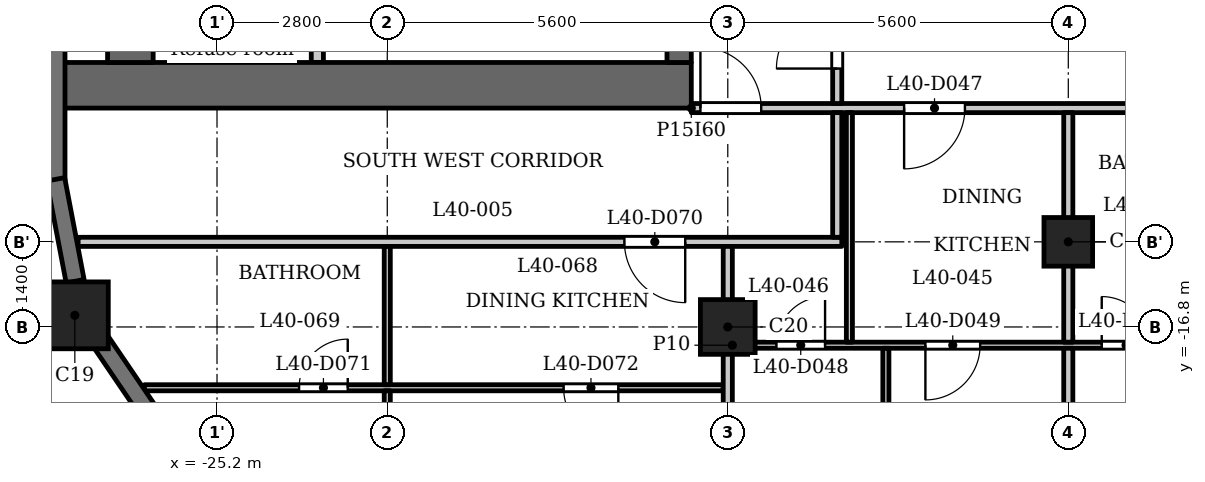
"""IFC4 building model, lengths in metres.
Left out: names, types, materials, properties, quantities, classifications, styles, units other than length and angle.
Written with IfcOpenShell. Run it as: python <this file> out.ifc"""

import sys

from ifc_helpers import new_model, si_unit, direction, frame, frame_2d, origin, origin_2d, place, context, subcontext, project, spatial, rectangle, extrude, element, fill, save


model = new_model("IFC4")
c1 = context("Model", 3, precision=1e-05, world=origin(), true_north=direction((0.0, 1.0)))
c2 = subcontext(c1, "Body", "Model", "MODEL_VIEW")
j1 = project(units=[si_unit("LENGTHUNIT", "METRE"), si_unit("PLANEANGLEUNIT", "RADIAN")], contexts=[c1])
p1 = place(None, origin())
s1 = spatial("IfcSite", under=j1, at=p1, CompositionType="ELEMENT")
p2 = place(p1, origin())
s2 = spatial("IfcBuilding", under=s1, at=p2, CompositionType="ELEMENT")
p3 = place(p2, frame((0.0, 0.0, 157.1)))
s3 = spatial("IfcBuildingStorey", under=s2, at=p3, CompositionType="ELEMENT", Elevation=157.1)
p4 = place(p3, frame((-27.538, -16.609, 0.0), z_axis=(0.0, 0.0, 1.0), x_axis=(1.0, 0.0, 0.0)))
e1 = element("IfcColumn", 1, at=p4, inside=s3, PredefinedType="COLUMN", context=c2, shape_type="SweptSolid", body=[
    extrude(rectangle(XDim=1.1, YDim=1.1, at=origin_2d()), origin(), (0.0, 0.0, 1.0), 3.5),
])
p5 = place(p3, frame((-16.8, -16.8, 0.0), z_axis=(0.0, 0.0, 1.0), x_axis=(1.0, 0.0, 0.0)))
e2 = element("IfcColumn", 2, at=p5, inside=s3, PredefinedType="COLUMN", context=c2, shape_type="SweptSolid", body=[
    extrude(rectangle(XDim=0.9, YDim=0.9, at=origin_2d()), origin(), (0.0, 0.0, 1.0), 3.5),
])
p6 = place(p3, frame((-11.2, -15.4, 0.0), z_axis=(0.0, 0.0, 1.0), x_axis=(1.0, 0.0, 0.0)))
e3 = element("IfcColumn", 3, at=p6, inside=s3, PredefinedType="COLUMN", context=c2, shape_type="SweptSolid", body=[
    extrude(rectangle(XDim=0.8, YDim=0.8, at=origin_2d()), origin(), (0.0, 0.0, 1.0), 3.5),
])
p7 = place(p3, frame((-27.85, -11.75, 0.0), z_axis=(0.0, 0.0, 1.0), x_axis=(0.0, -1.0, 0.0)))
e4 = element("IfcWall", 4, at=p7, inside=s3, PredefinedType="SOLIDWALL", context=c2, shape_type="SweptSolid", body=[
    extrude(rectangle(XDim=2.65, YDim=0.3, at=frame_2d((1.325, 0.0))), origin(), (0.0, 0.0, 1.0), 2.45),
])
p8 = place(p3, frame((-27.853, -14.372, 0.0), z_axis=(0.0, 0.0, 1.0), x_axis=(0.187302784601, -0.982302227871, 0.0)))
e5 = element("IfcWall", 5, at=p8, inside=s3, PredefinedType="SOLIDWALL", context=c2, shape_type="SweptSolid", body=[
    extrude(rectangle(XDim=1.706, YDim=0.3, at=frame_2d((0.853, 0.0))), origin(), (0.0, 0.0, 1.0), 2.45),
])
p9 = place(p3, frame((-27.138, -17.002, 0.0), z_axis=(0.0, 0.0, 1.0), x_axis=(0.562075160946, -0.827086158419, 0.0)))
e6 = element("IfcWall", 6, at=p9, inside=s3, PredefinedType="SOLIDWALL", context=c2, shape_type="SweptSolid", body=[
    extrude(rectangle(XDim=1.706, YDim=0.3, at=frame_2d((0.853, 0.0))), origin(), (0.0, 0.0, 1.0), 2.45),
])
p10 = place(p3, frame((-17.4, -12.825, 0.0), z_axis=(0.0, 0.0, 1.0), x_axis=(-1.0, 0.0, 0.0)))
e7 = element("IfcWall", 7, at=p10, inside=s3, PredefinedType="SHEAR", context=c2, shape_type="SweptSolid", body=[
    extrude(rectangle(XDim=10.4, YDim=0.75, at=frame_2d((5.2, 0.0))), origin(), (0.0, 0.0, 1.0), 3.2),
])
p11 = place(p3, frame((-17.6, -12.45, 0.0), z_axis=(0.0, 0.0, 1.0), x_axis=(0.0, 1.0, 0.0)))
e8 = element("IfcWall", 8, at=p11, inside=s3, PredefinedType="SHEAR", context=c2, shape_type="SweptSolid", body=[
    extrude(rectangle(XDim=24.9, YDim=0.4, at=frame_2d((12.45, 0.0))), origin(), (0.0, 0.0, 1.0), 3.2),
])
p12 = place(p11, frame((8.65, 0.0, 0.0)))
e9 = element("IfcOpeningElement", 9, at=p12, cuts=e8, PredefinedType="OPENING", context=c2, shape_type="SweptSolid", body=[
    extrude(rectangle(XDim=0.9, YDim=2.1, at=frame_2d((0.45, 1.05))), frame((0.0, 0.21, 0.0), z_axis=(0.0, -1.0, 0.0), x_axis=(1.0, 0.0, 0.0)), (0.0, 0.0, 1.0), 0.42),
])
p13 = place(p11, frame((15.6, 0.0, 0.0)))
e10 = element("IfcOpeningElement", 10, at=p13, cuts=e8, PredefinedType="OPENING", context=c2, shape_type="SweptSolid", body=[
    extrude(rectangle(XDim=1.1, YDim=2.1, at=frame_2d((0.55, 1.05))), frame((0.0, 0.21, 0.0), z_axis=(0.0, -1.0, 0.0), x_axis=(1.0, 0.0, 0.0)), (0.0, 0.0, 1.0), 0.42),
])
p14 = place(p11, frame((18.0, 0.0, 0.0)))
e11 = element("IfcOpeningElement", 11, at=p14, cuts=e8, PredefinedType="OPENING", context=c2, shape_type="SweptSolid", body=[
    extrude(rectangle(XDim=1.1, YDim=2.1, at=frame_2d((0.55, 1.05))), frame((0.0, 0.21, 0.0), z_axis=(0.0, -1.0, 0.0), x_axis=(1.0, 0.0, 0.0)), (0.0, 0.0, 1.0), 0.42),
])
p15 = place(p11, frame((23.025, 0.0, 0.0)))
e12 = element("IfcOpeningElement", 12, at=p15, cuts=e8, PredefinedType="OPENING", context=c2, shape_type="SweptSolid", body=[
    extrude(rectangle(XDim=1.1, YDim=2.1, at=frame_2d((0.55, 1.05))), frame((0.0, 0.21, 0.0), z_axis=(0.0, -1.0, 0.0), x_axis=(1.0, 0.0, 0.0)), (0.0, 0.0, 1.0), 0.42),
])
p16 = place(p11, frame((0.775, 0.0, 0.0)))
e13 = element("IfcOpeningElement", 13, at=p16, cuts=e8, PredefinedType="OPENING", context=c2, shape_type="SweptSolid", body=[
    extrude(rectangle(XDim=1.1, YDim=2.1, at=frame_2d((0.55, 1.05))), frame((0.0, 0.21, 0.0), z_axis=(0.0, -1.0, 0.0), x_axis=(1.0, 0.0, 0.0)), (0.0, 0.0, 1.0), 0.42),
])
p17 = place(p11, frame((12.925, 0.0, 0.0)))
e14 = element("IfcOpeningElement", 14, at=p17, cuts=e8, PredefinedType="OPENING", context=c2, shape_type="SweptSolid", body=[
    extrude(rectangle(XDim=1.8, YDim=2.1, at=frame_2d((0.9, 1.05))), frame((0.0, 0.21, 0.0), z_axis=(0.0, -1.0, 0.0), x_axis=(1.0, 0.0, 0.0)), (0.0, 0.0, 1.0), 0.42),
])
p18 = place(p3, frame((-26.625, -12.45, 0.0), z_axis=(0.0, 0.0, 1.0), x_axis=(0.0, 1.0, 0.0)))
e15 = element("IfcWall", 15, at=p18, inside=s3, PredefinedType="SHEAR", context=c2, shape_type="SweptSolid", body=[
    extrude(rectangle(XDim=24.9, YDim=0.75, at=frame_2d((12.45, 0.0))), origin(), (0.0, 0.0, 1.0), 3.2),
])
p19 = place(p3, frame((-23.55, -12.45, 0.0), z_axis=(0.0, 0.0, 1.0), x_axis=(0.0, 1.0, 0.0)))
e16 = element("IfcWall", 16, at=p19, inside=s3, PredefinedType="PARTITIONING", context=c2, shape_type="SweptSolid", body=[
    extrude(rectangle(XDim=2.65, YDim=0.2, at=frame_2d((1.325, 0.0))), origin(), (0.0, 0.0, 1.0), 3.2),
])
p20 = place(p19, frame((0.875, 0.0, 0.0)))
e17 = element("IfcOpeningElement", 17, at=p20, cuts=e16, PredefinedType="OPENING", context=c2, shape_type="SweptSolid", body=[
    extrude(rectangle(XDim=0.9, YDim=2.1, at=frame_2d((0.45, 1.05))), frame((0.0, 0.11, 0.0), z_axis=(0.0, -1.0, 0.0), x_axis=(1.0, 0.0, 0.0)), (0.0, 0.0, 1.0), 0.22),
])
p21 = place(p3, frame((-26.394, -17.8, 0.0), z_axis=(0.0, 0.0, 1.0), x_axis=(1.0, 0.0, 0.0)))
e18 = element("IfcWall", 18, at=p21, inside=s3, PredefinedType="PARTITIONING", context=c2, shape_type="SweptSolid", body=[
    extrude(rectangle(XDim=9.519, YDim=0.1, at=frame_2d((4.76, 0.0))), origin(), (0.0, 0.0, 1.0), 3.2),
])
p22 = place(p21, frame((2.544, 0.0, 0.0)))
e19 = element("IfcOpeningElement", 19, at=p22, cuts=e18, PredefinedType="OPENING", context=c2, shape_type="SweptSolid", body=[
    extrude(rectangle(XDim=0.8, YDim=2.1, at=frame_2d((0.4, 1.05))), frame((0.0, 0.06, 0.0), z_axis=(0.0, -1.0, 0.0), x_axis=(1.0, 0.0, 0.0)), (0.0, 0.0, 1.0), 0.12),
])
p23 = place(p21, frame((6.894, 0.0, 0.0)))
e20 = element("IfcOpeningElement", 20, at=p23, cuts=e18, PredefinedType="OPENING", context=c2, shape_type="SweptSolid", body=[
    extrude(rectangle(XDim=0.9, YDim=2.1, at=frame_2d((0.45, 1.05))), frame((0.0, 0.06, 0.0), z_axis=(0.0, -1.0, 0.0), x_axis=(1.0, 0.0, 0.0)), (0.0, 0.0, 1.0), 0.12),
])
p24 = place(p3, frame((-16.725, -17.1, 0.0), z_axis=(0.0, 0.0, 1.0), x_axis=(1.0, 0.0, 0.0)))
e21 = element("IfcWall", 21, at=p24, inside=s3, PredefinedType="PARTITIONING", context=c2, shape_type="SweptSolid", body=[
    extrude(rectangle(XDim=33.45, YDim=0.1, at=frame_2d((16.725, 0.0))), origin(), (0.0, 0.0, 1.0), 3.2),
])
p25 = place(p24, frame((0.725, 0.0, 0.0)))
e22 = element("IfcOpeningElement", 22, at=p25, cuts=e21, PredefinedType="OPENING", context=c2, shape_type="SweptSolid", body=[
    extrude(rectangle(XDim=0.8, YDim=2.1, at=frame_2d((0.4, 1.05))), frame((0.0, 0.06, 0.0), z_axis=(0.0, -1.0, 0.0), x_axis=(1.0, 0.0, 0.0)), (0.0, 0.0, 1.0), 0.12),
])
p26 = place(p24, frame((3.175, 0.0, 0.0)))
e23 = element("IfcOpeningElement", 23, at=p26, cuts=e21, PredefinedType="OPENING", context=c2, shape_type="SweptSolid", body=[
    extrude(rectangle(XDim=0.9, YDim=2.1, at=frame_2d((0.45, 1.05))), frame((0.0, 0.06, 0.0), z_axis=(0.0, -1.0, 0.0), x_axis=(1.0, 0.0, 0.0)), (0.0, 0.0, 1.0), 0.12),
])
p27 = place(p24, frame((6.075, 0.0, 0.0)))
e24 = element("IfcOpeningElement", 24, at=p27, cuts=e21, PredefinedType="OPENING", context=c2, shape_type="SweptSolid", body=[
    extrude(rectangle(XDim=0.8, YDim=2.1, at=frame_2d((0.4, 1.05))), frame((0.0, 0.06, 0.0), z_axis=(0.0, -1.0, 0.0), x_axis=(1.0, 0.0, 0.0)), (0.0, 0.0, 1.0), 0.12),
])
p28 = place(p24, frame((9.425, 0.0, 0.0)))
e25 = element("IfcOpeningElement", 25, at=p28, cuts=e21, PredefinedType="OPENING", context=c2, shape_type="SweptSolid", body=[
    extrude(rectangle(XDim=0.9, YDim=2.1, at=frame_2d((0.45, 1.05))), frame((0.0, 0.06, 0.0), z_axis=(0.0, -1.0, 0.0), x_axis=(1.0, 0.0, 0.0)), (0.0, 0.0, 1.0), 0.12),
])
p29 = place(p24, frame((12.675, 0.0, 0.0)))
e26 = element("IfcOpeningElement", 26, at=p29, cuts=e21, PredefinedType="OPENING", context=c2, shape_type="SweptSolid", body=[
    extrude(rectangle(XDim=0.8, YDim=2.1, at=frame_2d((0.4, 1.05))), frame((0.0, 0.06, 0.0), z_axis=(0.0, -1.0, 0.0), x_axis=(1.0, 0.0, 0.0)), (0.0, 0.0, 1.0), 0.12),
])
p30 = place(p24, frame((15.275, 0.0, 0.0)))
e27 = element("IfcOpeningElement", 27, at=p30, cuts=e21, PredefinedType="OPENING", context=c2, shape_type="SweptSolid", body=[
    extrude(rectangle(XDim=0.9, YDim=2.1, at=frame_2d((0.45, 1.05))), frame((0.0, 0.06, 0.0), z_axis=(0.0, -1.0, 0.0), x_axis=(1.0, 0.0, 0.0)), (0.0, 0.0, 1.0), 0.12),
])
p31 = place(p24, frame((20.625, 0.0, 0.0)))
e28 = element("IfcOpeningElement", 28, at=p31, cuts=e21, PredefinedType="OPENING", context=c2, shape_type="SweptSolid", body=[
    extrude(rectangle(XDim=0.8, YDim=2.1, at=frame_2d((0.4, 1.05))), frame((0.0, 0.06, 0.0), z_axis=(0.0, -1.0, 0.0), x_axis=(1.0, 0.0, 0.0)), (0.0, 0.0, 1.0), 0.12),
])
p32 = place(p24, frame((17.375, 0.0, 0.0)))
e29 = element("IfcOpeningElement", 29, at=p32, cuts=e21, PredefinedType="OPENING", context=c2, shape_type="SweptSolid", body=[
    extrude(rectangle(XDim=0.9, YDim=2.1, at=frame_2d((0.45, 1.05))), frame((0.0, 0.06, 0.0), z_axis=(0.0, -1.0, 0.0), x_axis=(1.0, 0.0, 0.0)), (0.0, 0.0, 1.0), 0.12),
])
p33 = place(p24, frame((31.075, 0.0, 0.0)))
e30 = element("IfcOpeningElement", 30, at=p33, cuts=e21, PredefinedType="OPENING", context=c2, shape_type="SweptSolid", body=[
    extrude(rectangle(XDim=0.8, YDim=2.1, at=frame_2d((0.4, 1.05))), frame((0.0, 0.06, 0.0), z_axis=(0.0, -1.0, 0.0), x_axis=(1.0, 0.0, 0.0)), (0.0, 0.0, 1.0), 0.12),
])
p34 = place(p24, frame((29.325, 0.0, 0.0)))
e31 = element("IfcOpeningElement", 31, at=p34, cuts=e21, PredefinedType="OPENING", context=c2, shape_type="SweptSolid", body=[
    extrude(rectangle(XDim=0.9, YDim=2.1, at=frame_2d((0.45, 1.05))), frame((0.0, 0.06, 0.0), z_axis=(0.0, -1.0, 0.0), x_axis=(1.0, 0.0, 0.0)), (0.0, 0.0, 1.0), 0.12),
])
p35 = place(p24, frame((23.725, 0.0, 0.0)))
e32 = element("IfcOpeningElement", 32, at=p35, cuts=e21, PredefinedType="OPENING", context=c2, shape_type="SweptSolid", body=[
    extrude(rectangle(XDim=0.9, YDim=2.1, at=frame_2d((0.45, 1.05))), frame((0.0, 0.06, 0.0), z_axis=(0.0, -1.0, 0.0), x_axis=(1.0, 0.0, 0.0)), (0.0, 0.0, 1.0), 0.12),
])
p36 = place(p24, frame((25.775, 0.0, 0.0)))
e33 = element("IfcOpeningElement", 33, at=p36, cuts=e21, PredefinedType="OPENING", context=c2, shape_type="SweptSolid", body=[
    extrude(rectangle(XDim=0.9, YDim=2.1, at=frame_2d((0.45, 1.05))), frame((0.0, 0.06, 0.0), z_axis=(0.0, -1.0, 0.0), x_axis=(1.0, 0.0, 0.0)), (0.0, 0.0, 1.0), 0.12),
])
p37 = place(p3, frame((-27.484, -15.4, 0.0), z_axis=(0.0, 0.0, 1.0), x_axis=(1.0, 0.0, 0.0)))
e34 = element("IfcWall", 34, at=p37, inside=s3, PredefinedType="PARTITIONING", context=c2, shape_type="SweptSolid", body=[
    extrude(rectangle(XDim=12.559, YDim=0.15, at=frame_2d((6.279, 0.0))), origin(), (0.0, 0.0, 1.0), 3.2),
])
p38 = place(p37, frame((8.984, 0.0, 0.0)))
e35 = element("IfcOpeningElement", 35, at=p38, cuts=e34, PredefinedType="OPENING", context=c2, shape_type="SweptSolid", body=[
    extrude(rectangle(XDim=1.0, YDim=2.1, at=frame_2d((0.5, 1.05))), frame((0.0, 0.085, 0.0), z_axis=(0.0, -1.0, 0.0), x_axis=(1.0, 0.0, 0.0)), (0.0, 0.0, 1.0), 0.17),
])
p39 = place(p3, frame((-17.4, -13.2, 0.0), z_axis=(0.0, 0.0, 1.0), x_axis=(1.0, 0.0, 0.0)))
e36 = element("IfcWall", 36, at=p39, inside=s3, PredefinedType="PARTITIONING", context=c2, shape_type="SweptSolid", body=[
    extrude(rectangle(XDim=34.8, YDim=0.15, at=frame_2d((17.4, 0.0))), origin(), (0.0, 0.0, 1.0), 3.2),
])
p40 = place(p39, frame((0.15, 0.0, 0.0)))
e37 = element("IfcOpeningElement", 37, at=p40, cuts=e36, PredefinedType="OPENING", context=c2, shape_type="SweptSolid", body=[
    extrude(rectangle(XDim=1.0, YDim=2.1, at=frame_2d((0.5, 1.05))), frame((0.0, 0.085, 0.0), z_axis=(0.0, -1.0, 0.0), x_axis=(1.0, 0.0, 0.0)), (0.0, 0.0, 1.0), 0.17),
])
p41 = place(p39, frame((33.55, 0.0, 0.0)))
e38 = element("IfcOpeningElement", 38, at=p41, cuts=e36, PredefinedType="OPENING", context=c2, shape_type="SweptSolid", body=[
    extrude(rectangle(XDim=1.0, YDim=2.1, at=frame_2d((0.5, 1.05))), frame((0.0, 0.085, 0.0), z_axis=(0.0, -1.0, 0.0), x_axis=(1.0, 0.0, 0.0)), (0.0, 0.0, 1.0), 0.17),
])
p42 = place(p39, frame((3.5, 0.0, 0.0)))
e39 = element("IfcOpeningElement", 39, at=p42, cuts=e36, PredefinedType="OPENING", context=c2, shape_type="SweptSolid", body=[
    extrude(rectangle(XDim=1.0, YDim=2.1, at=frame_2d((0.5, 1.05))), frame((0.0, 0.085, 0.0), z_axis=(0.0, -1.0, 0.0), x_axis=(1.0, 0.0, 0.0)), (0.0, 0.0, 1.0), 0.17),
])
p43 = place(p39, frame((10.1, 0.0, 0.0)))
e40 = element("IfcOpeningElement", 40, at=p43, cuts=e36, PredefinedType="OPENING", context=c2, shape_type="SweptSolid", body=[
    extrude(rectangle(XDim=1.0, YDim=2.1, at=frame_2d((0.5, 1.05))), frame((0.0, 0.085, 0.0), z_axis=(0.0, -1.0, 0.0), x_axis=(1.0, 0.0, 0.0)), (0.0, 0.0, 1.0), 0.17),
])
p44 = place(p39, frame((15.7, 0.0, 0.0)))
e41 = element("IfcOpeningElement", 41, at=p44, cuts=e36, PredefinedType="OPENING", context=c2, shape_type="SweptSolid", body=[
    extrude(rectangle(XDim=1.0, YDim=2.1, at=frame_2d((0.5, 1.05))), frame((0.0, 0.085, 0.0), z_axis=(0.0, -1.0, 0.0), x_axis=(1.0, 0.0, 0.0)), (0.0, 0.0, 1.0), 0.17),
])
p45 = place(p39, frame((18.05, 0.0, 0.0)))
e42 = element("IfcOpeningElement", 42, at=p45, cuts=e36, PredefinedType="OPENING", context=c2, shape_type="SweptSolid", body=[
    extrude(rectangle(XDim=1.0, YDim=2.1, at=frame_2d((0.5, 1.05))), frame((0.0, 0.085, 0.0), z_axis=(0.0, -1.0, 0.0), x_axis=(1.0, 0.0, 0.0)), (0.0, 0.0, 1.0), 0.17),
])
p46 = place(p39, frame((26.9, 0.0, 0.0)))
e43 = element("IfcOpeningElement", 43, at=p46, cuts=e36, PredefinedType="OPENING", context=c2, shape_type="SweptSolid", body=[
    extrude(rectangle(XDim=1.0, YDim=2.1, at=frame_2d((0.5, 1.05))), frame((0.0, 0.085, 0.0), z_axis=(0.0, -1.0, 0.0), x_axis=(1.0, 0.0, 0.0)), (0.0, 0.0, 1.0), 0.17),
])
p47 = place(p3, frame((-22.4, -21.72, 0.0), z_axis=(0.0, 0.0, 1.0), x_axis=(0.0, 1.0, 0.0)))
e44 = element("IfcWall", 44, at=p47, inside=s3, PredefinedType="PARTITIONING", context=c2, shape_type="SweptSolid", body=[
    extrude(rectangle(XDim=3.87, YDim=0.1, at=frame_2d((1.935, 0.0))), origin(), (0.0, 0.0, 1.0), 3.2),
])
p48 = place(p47, frame((1.62, 0.0, 0.0)))
e45 = element("IfcOpeningElement", 45, at=p48, cuts=e44, PredefinedType="OPENING", context=c2, shape_type="SweptSolid", body=[
    extrude(rectangle(XDim=0.9, YDim=2.1, at=frame_2d((0.45, 1.05))), frame((0.0, 0.06, 0.0), z_axis=(0.0, -1.0, 0.0), x_axis=(1.0, 0.0, 0.0)), (0.0, 0.0, 1.0), 0.12),
])
p49 = place(p3, frame((-22.4, -17.75, 0.0), z_axis=(0.0, 0.0, 1.0), x_axis=(0.0, 1.0, 0.0)))
e46 = element("IfcWall", 46, at=p49, inside=s3, PredefinedType="PARTITIONING", context=c2, shape_type="SweptSolid", body=[
    extrude(rectangle(XDim=2.275, YDim=0.1, at=frame_2d((1.137, 0.0))), origin(), (0.0, 0.0, 1.0), 3.2),
])
p50 = place(p3, frame((-16.8, -22.93, 0.0), z_axis=(0.0, 0.0, 1.0), x_axis=(0.0, 1.0, 0.0)))
e47 = element("IfcWall", 47, at=p50, inside=s3, PredefinedType="PARTITIONING", context=c2, shape_type="SweptSolid", body=[
    extrude(rectangle(XDim=7.455, YDim=0.15, at=frame_2d((3.728, 0.0))), origin(), (0.0, 0.0, 1.0), 3.2),
])
p51 = place(p3, frame((-15.0, -15.325, 0.0), z_axis=(0.0, 0.0, 1.0), x_axis=(0.0, 1.0, 0.0)))
e48 = element("IfcWall", 48, at=p51, inside=s3, PredefinedType="PARTITIONING", context=c2, shape_type="SweptSolid", body=[
    extrude(rectangle(XDim=2.05, YDim=0.15, at=frame_2d((1.025, 0.0))), origin(), (0.0, 0.0, 1.0), 3.2),
])
p52 = place(p3, frame((-15.0, -13.125, 0.0), z_axis=(0.0, 0.0, 1.0), x_axis=(0.0, 1.0, 0.0)))
e49 = element("IfcWall", 49, at=p52, inside=s3, PredefinedType="PARTITIONING", context=c2, shape_type="SweptSolid", body=[
    extrude(rectangle(XDim=6.356, YDim=0.15, at=frame_2d((3.178, 0.0))), origin(), (0.0, 0.0, 1.0), 3.2),
])
p53 = place(p52, frame((0.575, 0.0, 0.0)))
e50 = element("IfcOpeningElement", 50, at=p53, cuts=e49, PredefinedType="OPENING", context=c2, shape_type="SweptSolid", body=[
    extrude(rectangle(XDim=1.0, YDim=2.1, at=frame_2d((0.5, 1.05))), frame((0.0, 0.085, 0.0), z_axis=(0.0, -1.0, 0.0), x_axis=(1.0, 0.0, 0.0)), (0.0, 0.0, 1.0), 0.17),
])
p54 = place(p3, frame((-14.8, -17.05, 0.0), z_axis=(0.0, 0.0, 1.0), x_axis=(0.0, 1.0, 0.0)))
e51 = element("IfcWall", 51, at=p54, inside=s3, PredefinedType="PARTITIONING", context=c2, shape_type="SweptSolid", body=[
    extrude(rectangle(XDim=3.775, YDim=0.1, at=frame_2d((1.888, 0.0))), origin(), (0.0, 0.0, 1.0), 3.2),
])
p55 = place(p3, frame((-14.2, -22.08, 0.0), z_axis=(0.0, 0.0, 1.0), x_axis=(0.0, 1.0, 0.0)))
e52 = element("IfcWall", 52, at=p55, inside=s3, PredefinedType="PARTITIONING", context=c2, shape_type="SweptSolid", body=[
    extrude(rectangle(XDim=4.93, YDim=0.1, at=frame_2d((2.465, 0.0))), origin(), (0.0, 0.0, 1.0), 3.2),
])
p56 = place(p55, frame((0.43, 0.0, 0.0)))
e53 = element("IfcOpeningElement", 53, at=p56, cuts=e52, PredefinedType="OPENING", context=c2, shape_type="SweptSolid", body=[
    extrude(rectangle(XDim=0.9, YDim=2.1, at=frame_2d((0.45, 1.05))), frame((0.0, 0.06, 0.0), z_axis=(0.0, -1.0, 0.0), x_axis=(1.0, 0.0, 0.0)), (0.0, 0.0, 1.0), 0.12),
])
p57 = place(p3, frame((-11.2, -22.93, 0.0), z_axis=(0.0, 0.0, 1.0), x_axis=(0.0, 1.0, 0.0)))
e54 = element("IfcWall", 54, at=p57, inside=s3, PredefinedType="PARTITIONING", context=c2, shape_type="SweptSolid", body=[
    extrude(rectangle(XDim=5.78, YDim=0.15, at=frame_2d((2.89, 0.0))), origin(), (0.0, 0.0, 1.0), 3.2),
])
p58 = place(p3, frame((-11.2, -17.05, 0.0), z_axis=(0.0, 0.0, 1.0), x_axis=(0.0, 1.0, 0.0)))
e55 = element("IfcWall", 55, at=p58, inside=s3, PredefinedType="PARTITIONING", context=c2, shape_type="SweptSolid", body=[
    extrude(rectangle(XDim=3.775, YDim=0.15, at=frame_2d((1.888, 0.0))), origin(), (0.0, 0.0, 1.0), 3.2),
])
p59 = place(p53, origin())
e56 = element("IfcDoor", 56, at=p59, inside=s3, OperationType="SINGLE_SWING_RIGHT", PredefinedType="DOOR", context=c2, shape_type="SweptSolid", body=[
    extrude(rectangle(XDim=1.0, YDim=2.1, at=frame_2d((0.5, 1.05))), frame((0.0, 0.025, 0.0), z_axis=(0.0, -1.0, 0.0), x_axis=(1.0, 0.0, 0.0)), (0.0, 0.0, 1.0), 0.05),
])
fill(e50, e56)
p60 = place(p40, origin())
e57 = element("IfcDoor", 57, at=p60, inside=s3, OperationType="SINGLE_SWING_RIGHT", PredefinedType="DOOR", context=c2, shape_type="SweptSolid", body=[
    extrude(rectangle(XDim=1.0, YDim=2.1, at=frame_2d((0.5, 1.05))), frame((0.0, 0.025, 0.0), z_axis=(0.0, -1.0, 0.0), x_axis=(1.0, 0.0, 0.0)), (0.0, 0.0, 1.0), 0.05),
])
fill(e37, e57)
p61 = place(p42, origin())
e58 = element("IfcDoor", 58, at=p61, inside=s3, OperationType="SINGLE_SWING_LEFT", PredefinedType="DOOR", context=c2, shape_type="SweptSolid", body=[
    extrude(rectangle(XDim=1.0, YDim=2.1, at=frame_2d((0.5, 1.05))), frame((0.0, 0.025, 0.0), z_axis=(0.0, -1.0, 0.0), x_axis=(1.0, 0.0, 0.0)), (0.0, 0.0, 1.0), 0.05),
])
fill(e39, e58)
p62 = place(p25, origin())
e59 = element("IfcDoor", 59, at=p62, inside=s3, OperationType="SINGLE_SWING_LEFT", PredefinedType="DOOR", context=c2, shape_type="SweptSolid", body=[
    extrude(rectangle(XDim=0.8, YDim=2.1, at=frame_2d((0.4, 1.05))), frame((0.0, 0.025, 0.0), z_axis=(0.0, -1.0, 0.0), x_axis=(1.0, 0.0, 0.0)), (0.0, 0.0, 1.0), 0.05),
])
fill(e22, e59)
p63 = place(p26, origin())
e60 = element("IfcDoor", 60, at=p63, inside=s3, OperationType="SINGLE_SWING_LEFT", PredefinedType="DOOR", context=c2, shape_type="SweptSolid", body=[
    extrude(rectangle(XDim=0.9, YDim=2.1, at=frame_2d((0.45, 1.05))), frame((0.0, 0.025, 0.0), z_axis=(0.0, -1.0, 0.0), x_axis=(1.0, 0.0, 0.0)), (0.0, 0.0, 1.0), 0.05),
])
fill(e23, e60)
p64 = place(p27, origin())
e61 = element("IfcDoor", 61, at=p64, inside=s3, OperationType="SINGLE_SWING_RIGHT", PredefinedType="DOOR", context=c2, shape_type="SweptSolid", body=[
    extrude(rectangle(XDim=0.8, YDim=2.1, at=frame_2d((0.4, 1.05))), frame((0.0, 0.025, 0.0), z_axis=(0.0, -1.0, 0.0), x_axis=(1.0, 0.0, 0.0)), (0.0, 0.0, 1.0), 0.05),
])
fill(e24, e61)
p65 = place(p38, origin())
e62 = element("IfcDoor", 62, at=p65, inside=s3, OperationType="SINGLE_SWING_RIGHT", PredefinedType="DOOR", context=c2, shape_type="SweptSolid", body=[
    extrude(rectangle(XDim=1.0, YDim=2.1, at=frame_2d((0.5, 1.05))), frame((0.0, 0.025, 0.0), z_axis=(0.0, -1.0, 0.0), x_axis=(1.0, 0.0, 0.0)), (0.0, 0.0, 1.0), 0.05),
])
fill(e35, e62)
p66 = place(p22, origin())
e63 = element("IfcDoor", 63, at=p66, inside=s3, OperationType="SINGLE_SWING_LEFT", PredefinedType="DOOR", context=c2, shape_type="SweptSolid", body=[
    extrude(rectangle(XDim=0.8, YDim=2.1, at=frame_2d((0.4, 1.05))), frame((0.0, 0.025, 0.0), z_axis=(0.0, -1.0, 0.0), x_axis=(1.0, 0.0, 0.0)), (0.0, 0.0, 1.0), 0.05),
])
fill(e19, e63)
p67 = place(p23, origin())
e64 = element("IfcDoor", 64, at=p67, inside=s3, OperationType="SINGLE_SWING_RIGHT", PredefinedType="DOOR", context=c2, shape_type="SweptSolid", body=[
    extrude(rectangle(XDim=0.9, YDim=2.1, at=frame_2d((0.45, 1.05))), frame((0.0, 0.025, 0.0), z_axis=(0.0, -1.0, 0.0), x_axis=(1.0, 0.0, 0.0)), (0.0, 0.0, 1.0), 0.05),
])
fill(e20, e64)
save(model, sys.argv[1])
